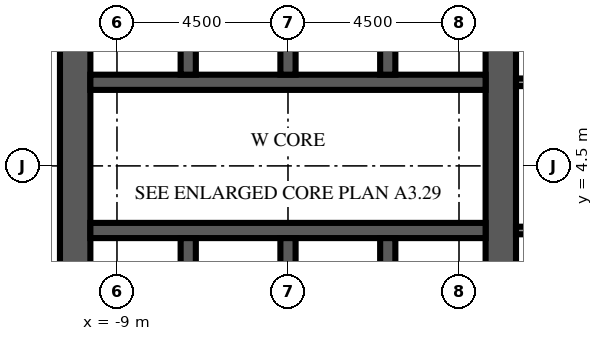
"""IFC4 building model, lengths in metres.
Left out: names, types, materials, properties, quantities, classifications, styles, units other than length and angle.
Written with IfcOpenShell. Run it as: python <this file> out.ifc"""

import sys

from ifc_helpers import new_model, si_unit, direction, frame, frame_2d, origin, place, context, subcontext, project, spatial, rectangle, extrude, element, fill, save


model = new_model("IFC4")
c1 = context("Model", 3, precision=1e-05, world=origin(), true_north=direction((0.0, 1.0)))
c2 = subcontext(c1, "Body", "Model", "MODEL_VIEW")
j1 = project(units=[si_unit("LENGTHUNIT", "METRE"), si_unit("PLANEANGLEUNIT", "RADIAN")], contexts=[c1])
p1 = place(None, origin())
s1 = spatial("IfcSite", under=j1, at=p1, CompositionType="ELEMENT")
p2 = place(p1, origin())
s2 = spatial("IfcBuilding", under=s1, at=p2, CompositionType="ELEMENT")
p3 = place(p2, frame((0.0, 0.0, 185.5)))
s3 = spatial("IfcBuildingStorey", under=s2, at=p3, CompositionType="ELEMENT", Elevation=185.5)
p4 = place(p3, frame((-10.1, -9.0, 0.0), z_axis=(0.0, 0.0, 1.0), x_axis=(0.0, 1.0, 0.0)))
e1 = element("IfcWall", 1, at=p4, inside=s3, PredefinedType="SHEAR", context=c2, shape_type="SweptSolid", body=[
    extrude(rectangle(XDim=27.5, YDim=0.8, at=frame_2d((13.75, 0.0))), origin(), (0.0, 0.0, 1.0), 6.0),
])
p5 = place(p4, frame((12.55, 0.0, 0.0)))
e2 = element("IfcOpeningElement", 2, at=p5, cuts=e1, PredefinedType="OPENING", context=c2, shape_type="SweptSolid", body=[
    extrude(rectangle(XDim=2.4, YDim=2.4, at=frame_2d((1.2, 1.2))), frame((0.0, 0.41, 0.0), z_axis=(0.0, -1.0, 0.0), x_axis=(1.0, 0.0, 0.0)), (0.0, 0.0, 1.0), 0.82),
])
p6 = place(p4, frame((6.825, 0.0, 0.0)))
e3 = element("IfcOpeningElement", 3, at=p6, cuts=e1, PredefinedType="OPENING", context=c2, shape_type="SweptSolid", body=[
    extrude(rectangle(XDim=1.2, YDim=2.1, at=frame_2d((0.6, 1.05))), frame((0.0, 0.41, 0.0), z_axis=(0.0, -1.0, 0.0), x_axis=(1.0, 0.0, 0.0)), (0.0, 0.0, 1.0), 0.82),
])
p7 = place(p4, frame((19.475, 0.0, 0.0)))
e4 = element("IfcOpeningElement", 4, at=p7, cuts=e1, PredefinedType="OPENING", context=c2, shape_type="SweptSolid", body=[
    extrude(rectangle(XDim=1.2, YDim=2.1, at=frame_2d((0.6, 1.05))), frame((0.0, 0.41, 0.0), z_axis=(0.0, -1.0, 0.0), x_axis=(1.0, 0.0, 0.0)), (0.0, 0.0, 1.0), 0.82),
])
p8 = place(p3, frame((1.1, -9.0, 0.0), z_axis=(0.0, 0.0, 1.0), x_axis=(0.0, 1.0, 0.0)))
e5 = element("IfcWall", 5, at=p8, inside=s3, PredefinedType="SHEAR", context=c2, shape_type="SweptSolid", body=[
    extrude(rectangle(XDim=27.5, YDim=0.8, at=frame_2d((13.75, 0.0))), origin(), (0.0, 0.0, 1.0), 6.0),
])
p9 = place(p8, frame((12.55, 0.0, 0.0)))
e6 = element("IfcOpeningElement", 6, at=p9, cuts=e5, PredefinedType="OPENING", context=c2, shape_type="SweptSolid", body=[
    extrude(rectangle(XDim=2.4, YDim=2.4, at=frame_2d((1.2, 1.2))), frame((0.0, 0.41, 0.0), z_axis=(0.0, -1.0, 0.0), x_axis=(1.0, 0.0, 0.0)), (0.0, 0.0, 1.0), 0.82),
])
p10 = place(p8, frame((3.85, 0.0, 0.0)))
e7 = element("IfcOpeningElement", 7, at=p10, cuts=e5, PredefinedType="OPENING", context=c2, shape_type="SweptSolid", body=[
    extrude(rectangle(XDim=0.95, YDim=2.1, at=frame_2d((0.475, 1.05))), frame((0.0, 0.41, 0.0), z_axis=(0.0, -1.0, 0.0), x_axis=(1.0, 0.0, 0.0)), (0.0, 0.0, 1.0), 0.82),
])
p11 = place(p8, frame((23.475, 0.0, 0.0)))
e8 = element("IfcOpeningElement", 8, at=p11, cuts=e5, PredefinedType="OPENING", context=c2, shape_type="SweptSolid", body=[
    extrude(rectangle(XDim=1.2, YDim=2.1, at=frame_2d((0.6, 1.05))), frame((0.0, 0.41, 0.0), z_axis=(0.0, -1.0, 0.0), x_axis=(1.0, 0.0, 0.0)), (0.0, 0.0, 1.0), 0.82),
])
p12 = place(p3, frame((-9.7, 2.8, 0.0), z_axis=(0.0, 0.0, 1.0), x_axis=(1.0, 0.0, 0.0)))
e9 = element("IfcWall", 9, at=p12, inside=s3, PredefinedType="SHEAR", context=c2, shape_type="SweptSolid", body=[
    extrude(rectangle(XDim=10.4, YDim=0.4, at=frame_2d((5.2, 0.0))), origin(), (0.0, 0.0, 1.0), 6.0),
])
p13 = place(p12, frame((0.738, 0.0, 0.0)))
e10 = element("IfcOpeningElement", 10, at=p13, cuts=e9, PredefinedType="OPENING", context=c2, shape_type="SweptSolid", body=[
    extrude(rectangle(XDim=1.1, YDim=2.1, at=frame_2d((0.55, 1.05))), frame((0.0, 0.21, 0.0), z_axis=(0.0, -1.0, 0.0), x_axis=(1.0, 0.0, 0.0)), (0.0, 0.0, 1.0), 0.42),
])
p14 = place(p12, frame((3.337, 0.0, 0.0)))
e11 = element("IfcOpeningElement", 11, at=p14, cuts=e9, PredefinedType="OPENING", context=c2, shape_type="SweptSolid", body=[
    extrude(rectangle(XDim=1.1, YDim=2.1, at=frame_2d((0.55, 1.05))), frame((0.0, 0.21, 0.0), z_axis=(0.0, -1.0, 0.0), x_axis=(1.0, 0.0, 0.0)), (0.0, 0.0, 1.0), 0.42),
])
p15 = place(p12, frame((6.012, 0.0, 0.0)))
e12 = element("IfcOpeningElement", 12, at=p15, cuts=e9, PredefinedType="OPENING", context=c2, shape_type="SweptSolid", body=[
    extrude(rectangle(XDim=1.0, YDim=2.1, at=frame_2d((0.5, 1.05))), frame((0.0, 0.21, 0.0), z_axis=(0.0, -1.0, 0.0), x_axis=(1.0, 0.0, 0.0)), (0.0, 0.0, 1.0), 0.42),
])
p16 = place(p12, frame((8.613, 0.0, 0.0)))
e13 = element("IfcOpeningElement", 13, at=p16, cuts=e9, PredefinedType="OPENING", context=c2, shape_type="SweptSolid", body=[
    extrude(rectangle(XDim=1.0, YDim=2.1, at=frame_2d((0.5, 1.05))), frame((0.0, 0.21, 0.0), z_axis=(0.0, -1.0, 0.0), x_axis=(1.0, 0.0, 0.0)), (0.0, 0.0, 1.0), 0.42),
])
p17 = place(p3, frame((-9.7, 6.7, 0.0), z_axis=(0.0, 0.0, 1.0), x_axis=(1.0, 0.0, 0.0)))
e14 = element("IfcWall", 14, at=p17, inside=s3, PredefinedType="SHEAR", context=c2, shape_type="SweptSolid", body=[
    extrude(rectangle(XDim=10.4, YDim=0.4, at=frame_2d((5.2, 0.0))), origin(), (0.0, 0.0, 1.0), 6.0),
])
p18 = place(p17, frame((3.337, 0.0, 0.0)))
e15 = element("IfcOpeningElement", 15, at=p18, cuts=e14, PredefinedType="OPENING", context=c2, shape_type="SweptSolid", body=[
    extrude(rectangle(XDim=1.1, YDim=2.1, at=frame_2d((0.55, 1.05))), frame((0.0, 0.21, 0.0), z_axis=(0.0, -1.0, 0.0), x_axis=(1.0, 0.0, 0.0)), (0.0, 0.0, 1.0), 0.42),
])
p19 = place(p17, frame((5.962, 0.0, 0.0)))
e16 = element("IfcOpeningElement", 16, at=p19, cuts=e14, PredefinedType="OPENING", context=c2, shape_type="SweptSolid", body=[
    extrude(rectangle(XDim=1.1, YDim=2.1, at=frame_2d((0.55, 1.05))), frame((0.0, 0.21, 0.0), z_axis=(0.0, -1.0, 0.0), x_axis=(1.0, 0.0, 0.0)), (0.0, 0.0, 1.0), 0.42),
])
p20 = place(p17, frame((8.663, 0.0, 0.0)))
e17 = element("IfcOpeningElement", 17, at=p20, cuts=e14, PredefinedType="OPENING", context=c2, shape_type="SweptSolid", body=[
    extrude(rectangle(XDim=1.1, YDim=2.1, at=frame_2d((0.55, 1.05))), frame((0.0, 0.21, 0.0), z_axis=(0.0, -1.0, 0.0), x_axis=(1.0, 0.0, 0.0)), (0.0, 0.0, 1.0), 0.42),
])
p21 = place(p17, frame((0.688, 0.0, 0.0)))
e18 = element("IfcOpeningElement", 18, at=p21, cuts=e14, PredefinedType="OPENING", context=c2, shape_type="SweptSolid", body=[
    extrude(rectangle(XDim=1.0, YDim=2.1, at=frame_2d((0.5, 1.05))), frame((0.0, 0.21, 0.0), z_axis=(0.0, -1.0, 0.0), x_axis=(1.0, 0.0, 0.0)), (0.0, 0.0, 1.0), 0.42),
])
for number, where, z_axis, x_axis in (
    (19, (-7.125, -0.3, 0.0), (0.0, 0.0, 1.0), (0.0, 1.0, 0.0)),
    (20, (-7.125, 6.9, 0.0), (0.0, 0.0, 1.0), (0.0, 1.0, 0.0)),
    (21, (-4.5, -0.3, 0.0), (0.0, 0.0, 1.0), (0.0, 1.0, 0.0)),
    (22, (-4.5, 6.9, 0.0), (0.0, 0.0, 1.0), (0.0, 1.0, 0.0)),
    (23, (-1.875, -0.3, 0.0), (0.0, 0.0, 1.0), (0.0, 1.0, 0.0)),
    (24, (-1.875, 6.9, 0.0), (0.0, 0.0, 1.0), (0.0, 1.0, 0.0)),
):
    element("IfcWall", number, at=place(p3, frame(where, z_axis=z_axis, x_axis=x_axis)), inside=s3, PredefinedType="SHEAR", context=c2, shape_type="SweptSolid", body=[
        extrude(rectangle(XDim=2.9, YDim=0.4, at=frame_2d((1.45, 0.0))), origin(), (0.0, 0.0, 1.0), 6.0),
    ])
for number, where, z_axis, x_axis in (
    (25, (1.5, 2.8, 0.0), (0.0, 0.0, 1.0), (1.0, 0.0, 0.0)),
    (26, (1.5, 6.7, 0.0), (0.0, 0.0, 1.0), (1.0, 0.0, 0.0)),
):
    element("IfcWall", number, at=place(p3, frame(where, z_axis=z_axis, x_axis=x_axis)), inside=s3, PredefinedType="PARTITIONING", context=c2, shape_type="SweptSolid", body=[
        extrude(rectangle(XDim=1.5, YDim=0.2, at=frame_2d((0.75, 0.0))), origin(), (0.0, 0.0, 1.0), 5.55),
    ])
p22 = place(p13, origin())
e27 = element("IfcDoor", 27, at=p22, inside=s3, OperationType="DOUBLE_DOOR_SLIDING", PredefinedType="DOOR", context=c2, shape_type="SweptSolid", body=[
    extrude(rectangle(XDim=1.1, YDim=2.1, at=frame_2d((0.55, 1.05))), frame((0.0, 0.025, 0.0), z_axis=(0.0, -1.0, 0.0), x_axis=(1.0, 0.0, 0.0)), (0.0, 0.0, 1.0), 0.05),
])
fill(e10, e27)
p23 = place(p14, origin())
e28 = element("IfcDoor", 28, at=p23, inside=s3, OperationType="DOUBLE_DOOR_SLIDING", PredefinedType="DOOR", context=c2, shape_type="SweptSolid", body=[
    extrude(rectangle(XDim=1.1, YDim=2.1, at=frame_2d((0.55, 1.05))), frame((0.0, 0.025, 0.0), z_axis=(0.0, -1.0, 0.0), x_axis=(1.0, 0.0, 0.0)), (0.0, 0.0, 1.0), 0.05),
])
fill(e11, e28)
p24 = place(p18, origin())
e29 = element("IfcDoor", 29, at=p24, inside=s3, OperationType="DOUBLE_DOOR_SLIDING", PredefinedType="DOOR", context=c2, shape_type="SweptSolid", body=[
    extrude(rectangle(XDim=1.1, YDim=2.1, at=frame_2d((0.55, 1.05))), frame((0.0, 0.025, 0.0), z_axis=(0.0, -1.0, 0.0), x_axis=(1.0, 0.0, 0.0)), (0.0, 0.0, 1.0), 0.05),
])
fill(e15, e29)
p25 = place(p19, origin())
e30 = element("IfcDoor", 30, at=p25, inside=s3, OperationType="DOUBLE_DOOR_SLIDING", PredefinedType="DOOR", context=c2, shape_type="SweptSolid", body=[
    extrude(rectangle(XDim=1.1, YDim=2.1, at=frame_2d((0.55, 1.05))), frame((0.0, 0.025, 0.0), z_axis=(0.0, -1.0, 0.0), x_axis=(1.0, 0.0, 0.0)), (0.0, 0.0, 1.0), 0.05),
])
fill(e16, e30)
p26 = place(p20, origin())
e31 = element("IfcDoor", 31, at=p26, inside=s3, OperationType="DOUBLE_DOOR_SLIDING", PredefinedType="DOOR", context=c2, shape_type="SweptSolid", body=[
    extrude(rectangle(XDim=1.1, YDim=2.1, at=frame_2d((0.55, 1.05))), frame((0.0, 0.025, 0.0), z_axis=(0.0, -1.0, 0.0), x_axis=(1.0, 0.0, 0.0)), (0.0, 0.0, 1.0), 0.05),
])
fill(e17, e31)
p27 = place(p5, origin())
e32 = element("IfcDoor", 32, at=p27, inside=s3, OperationType="DOUBLE_DOOR_DOUBLE_SWING", PredefinedType="DOOR", context=c2, shape_type="SweptSolid", body=[
    extrude(rectangle(XDim=2.4, YDim=2.4, at=frame_2d((1.2, 1.2))), frame((0.0, 0.025, 0.0), z_axis=(0.0, -1.0, 0.0), x_axis=(1.0, 0.0, 0.0)), (0.0, 0.0, 1.0), 0.05),
])
fill(e2, e32)
p28 = place(p9, origin())
e33 = element("IfcDoor", 33, at=p28, inside=s3, OperationType="DOUBLE_DOOR_DOUBLE_SWING", PredefinedType="DOOR", context=c2, shape_type="SweptSolid", body=[
    extrude(rectangle(XDim=2.4, YDim=2.4, at=frame_2d((1.2, 1.2))), frame((0.0, 0.025, 0.0), z_axis=(0.0, -1.0, 0.0), x_axis=(1.0, 0.0, 0.0)), (0.0, 0.0, 1.0), 0.05),
])
fill(e6, e33)
p29 = place(p15, origin())
e34 = element("IfcDoor", 34, at=p29, inside=s3, OperationType="SINGLE_SWING_LEFT", PredefinedType="DOOR", context=c2, shape_type="SweptSolid", body=[
    extrude(rectangle(XDim=1.0, YDim=2.1, at=frame_2d((0.5, 1.05))), frame((0.0, 0.025, 0.0), z_axis=(0.0, -1.0, 0.0), x_axis=(1.0, 0.0, 0.0)), (0.0, 0.0, 1.0), 0.05),
])
fill(e12, e34)
p30 = place(p16, origin())
e35 = element("IfcDoor", 35, at=p30, inside=s3, OperationType="SINGLE_SWING_RIGHT", PredefinedType="DOOR", context=c2, shape_type="SweptSolid", body=[
    extrude(rectangle(XDim=1.0, YDim=2.1, at=frame_2d((0.5, 1.05))), frame((0.0, 0.025, 0.0), z_axis=(0.0, -1.0, 0.0), x_axis=(1.0, 0.0, 0.0)), (0.0, 0.0, 1.0), 0.05),
])
fill(e13, e35)
p31 = place(p21, origin())
e36 = element("IfcDoor", 36, at=p31, inside=s3, OperationType="SINGLE_SWING_LEFT", PredefinedType="DOOR", context=c2, shape_type="SweptSolid", body=[
    extrude(rectangle(XDim=1.0, YDim=2.1, at=frame_2d((0.5, 1.05))), frame((0.0, 0.025, 0.0), z_axis=(0.0, -1.0, 0.0), x_axis=(1.0, 0.0, 0.0)), (0.0, 0.0, 1.0), 0.05),
])
fill(e18, e36)
save(model, sys.argv[1])
